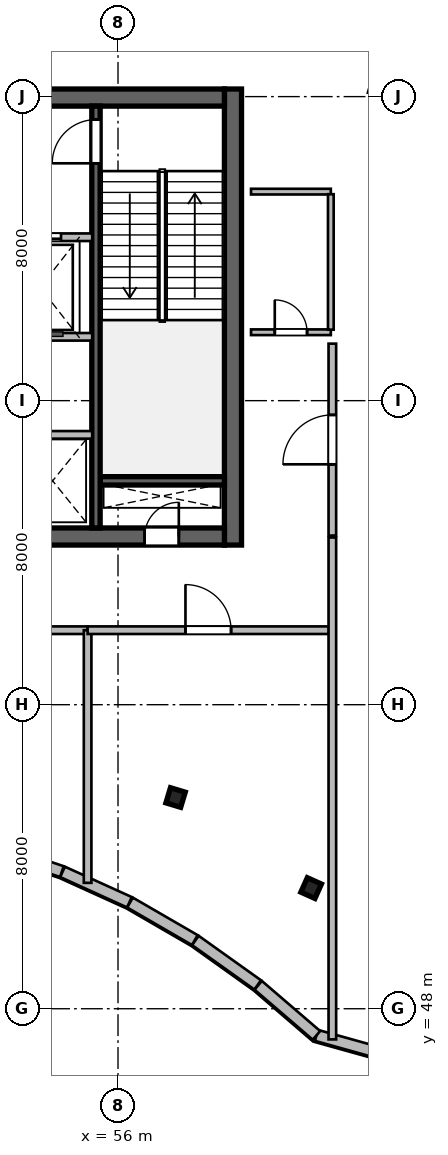
"""IFC4 building model, lengths in metres.
Left out: names, types, materials, properties, quantities, classifications, styles, units other than length and angle.
Written with IfcOpenShell. Run it as: python <this file> out.ifc"""

import sys

from ifc_helpers import new_model, si_unit, direction, frame, frame_2d, origin, origin_2d, place, context, subcontext, project, spatial, rectangle, i_section, extrude, source, transform, mapped, element, fill, save


model = new_model("IFC4")
c1 = context("Model", 3, precision=1e-05, world=origin(), true_north=direction((0.0, 1.0)))
c2 = subcontext(c1, "Body", "Model", "MODEL_VIEW")
j1 = project(units=[si_unit("LENGTHUNIT", "METRE"), si_unit("PLANEANGLEUNIT", "RADIAN")], contexts=[c1])
p1 = place(None, origin())
s1 = spatial("IfcSite", under=j1, at=p1, CompositionType="ELEMENT")
p2 = place(p1, origin())
s2 = spatial("IfcBuilding", under=s1, at=p2, CompositionType="ELEMENT")
p3 = place(p2, frame((0.0, 0.0, 254.7)))
s3 = spatial("IfcBuildingStorey", under=s2, at=p3, CompositionType="ELEMENT", Elevation=254.7)
m1 = source(origin(), c2, "Body", "SweptSolid", [
    extrude(rectangle(XDim=12.0, YDim=0.45, at=frame_2d((6.0, 0.0))), origin(), (0.0, 0.0, 1.0), 5.4),
])
p4 = place(p3, frame((59.025, 60.2, 0.0), z_axis=(0.0, 0.0, 1.0), x_axis=(0.0, 1.0, 0.0)))
e1 = element("IfcWall", 1, at=p4, inside=s3, PredefinedType="SHEAR", context=c2, shape_type="MappedRepresentation", body=[
    mapped(m1, transform((0.0, 0.0, 0.0), scale=1.0)),
])
m2 = source(origin(), c2, "Body", "SweptSolid", [
    extrude(rectangle(XDim=21.6, YDim=0.45, at=frame_2d((10.8, 0.0))), origin(), (0.0, 0.0, 1.0), 5.4),
])
p5 = place(p3, frame((37.2, 60.425, 0.0), z_axis=(0.0, 0.0, 1.0), x_axis=(1.0, 0.0, 0.0)))
e2 = element("IfcWall", 2, at=p5, inside=s3, PredefinedType="SHEAR", context=c2, shape_type="MappedRepresentation", body=[
    mapped(m2, transform((0.0, 0.0, 0.0), scale=1.0)),
])
p6 = place(p5, frame((1.1, 0.0, 0.0)))
e3 = element("IfcOpeningElement", 3, at=p6, cuts=e2, PredefinedType="OPENING", context=c2, shape_type="SweptSolid", body=[
    extrude(rectangle(XDim=1.15, YDim=2.15, at=frame_2d((0.575, 1.075))), frame((0.0, 0.235, 0.0), z_axis=(0.0, -1.0, 0.0), x_axis=(1.0, 0.0, 0.0)), (0.0, 0.0, 1.0), 0.47),
])
p7 = place(p5, frame((19.5, 0.0, 0.0)))
e4 = element("IfcOpeningElement", 4, at=p7, cuts=e2, PredefinedType="OPENING", context=c2, shape_type="SweptSolid", body=[
    extrude(rectangle(XDim=0.9, YDim=2.1, at=frame_2d((0.45, 1.05))), frame((0.0, 0.235, 0.0), z_axis=(0.0, -1.0, 0.0), x_axis=(1.0, 0.0, 0.0)), (0.0, 0.0, 1.0), 0.47),
])
p8 = place(p5, frame((12.02, 0.0, 0.0)))
e5 = element("IfcOpeningElement", 5, at=p8, cuts=e2, PredefinedType="OPENING", context=c2, shape_type="SweptSolid", body=[
    extrude(rectangle(XDim=1.6, YDim=2.15, at=frame_2d((0.8, 1.075))), frame((0.0, 0.235, 0.0), z_axis=(0.0, -1.0, 0.0), x_axis=(1.0, 0.0, 0.0)), (0.0, 0.0, 1.0), 0.47),
])
p9 = place(p3, frame((37.2, 71.975, 0.0), z_axis=(0.0, 0.0, 1.0), x_axis=(1.0, 0.0, 0.0)))
e6 = element("IfcWall", 6, at=p9, inside=s3, PredefinedType="SHEAR", context=c2, shape_type="MappedRepresentation", body=[
    mapped(m2, transform((0.0, 0.0, 0.0), scale=1.0)),
])
p10 = place(p9, frame((1.2, 0.0, 0.0)))
e7 = element("IfcOpeningElement", 7, at=p10, cuts=e6, PredefinedType="OPENING", context=c2, shape_type="SweptSolid", body=[
    extrude(rectangle(XDim=0.9, YDim=2.1, at=frame_2d((0.45, 1.05))), frame((0.0, 0.235, 0.0), z_axis=(0.0, -1.0, 0.0), x_axis=(1.0, 0.0, 0.0)), (0.0, 0.0, 1.0), 0.47),
])
p11 = place(p9, frame((14.7, 0.0, 0.0)))
e8 = element("IfcOpeningElement", 8, at=p11, cuts=e6, PredefinedType="OPENING", context=c2, shape_type="SweptSolid", body=[
    extrude(rectangle(XDim=1.2, YDim=2.15, at=frame_2d((0.6, 1.075))), frame((0.0, 0.235, 0.0), z_axis=(0.0, -1.0, 0.0), x_axis=(1.0, 0.0, 0.0)), (0.0, 0.0, 1.0), 0.47),
])
p12 = place(p9, frame((4.15, 0.0, 0.0)))
e9 = element("IfcOpeningElement", 9, at=p12, cuts=e6, PredefinedType="OPENING", context=c2, shape_type="SweptSolid", body=[
    extrude(rectangle(XDim=1.3, YDim=2.15, at=frame_2d((0.65, 1.075))), frame((0.0, 0.235, 0.0), z_axis=(0.0, -1.0, 0.0), x_axis=(1.0, 0.0, 0.0)), (0.0, 0.0, 1.0), 0.47),
])
p13 = place(p9, frame((7.1, 0.0, 0.0)))
e10 = element("IfcOpeningElement", 10, at=p13, cuts=e6, PredefinedType="OPENING", context=c2, shape_type="SweptSolid", body=[
    extrude(rectangle(XDim=0.9, YDim=2.1, at=frame_2d((0.45, 1.05))), frame((0.0, 0.235, 0.0), z_axis=(0.0, -1.0, 0.0), x_axis=(1.0, 0.0, 0.0)), (0.0, 0.0, 1.0), 0.47),
])
m3 = source(origin(), c2, "Body", "SweptSolid", [
    extrude(rectangle(XDim=3.27, YDim=0.22, at=frame_2d((1.635, 0.0))), origin(), (0.0, 0.0, 1.0), 5.4),
])
p14 = place(p3, frame((55.53, 61.89, 0.0), z_axis=(0.0, 0.0, 1.0), x_axis=(1.0, 0.0, 0.0)))
e11 = element("IfcWall", 11, at=p14, inside=s3, PredefinedType="SHEAR", context=c2, shape_type="MappedRepresentation", body=[
    mapped(m3, transform((0.0, 0.0, 0.0), scale=1.0)),
])
m4 = source(origin(), c2, "Body", "SweptSolid", [
    extrude(rectangle(XDim=11.1, YDim=0.22, at=frame_2d((5.55, 0.0))), origin(), (0.0, 0.0, 1.0), 5.4),
])
p15 = place(p3, frame((55.42, 60.65, 0.0), z_axis=(0.0, 0.0, 1.0), x_axis=(0.0, 1.0, 0.0)))
e12 = element("IfcWall", 12, at=p15, inside=s3, PredefinedType="SHEAR", context=c2, shape_type="MappedRepresentation", body=[
    mapped(m4, transform((0.0, 0.0, 0.0), scale=1.0)),
])
p16 = place(p15, frame((9.595, 0.0, 0.0)))
e13 = element("IfcOpeningElement", 13, at=p16, cuts=e12, PredefinedType="OPENING", context=c2, shape_type="SweptSolid", body=[
    extrude(rectangle(XDim=1.15, YDim=2.15, at=frame_2d((0.575, 1.075))), frame((0.0, 0.12, 0.0), z_axis=(0.0, -1.0, 0.0), x_axis=(1.0, 0.0, 0.0)), (0.0, 0.0, 1.0), 0.24),
])
m5 = source(origin(), c2, "Body", "SweptSolid", [
    extrude(i_section(OverallWidth=0.406, OverallDepth=0.416, WebThickness=0.03, FlangeThickness=0.048, at=origin_2d()), origin(), (0.0, 0.0, 1.0), 5.4),
])
for number, where, z_axis, x_axis in (
    (14, (57.515, 53.558, 0.0), (0.0, 0.0, 1.0), (0.289, 0.957, 0.0)),
    (15, (61.082, 51.175, 0.0), (0.0, 0.0, 1.0), (0.409, 0.912, 0.0)),
):
    element("IfcColumn", number, at=place(p3, frame(where, z_axis=z_axis, x_axis=x_axis)), inside=s3, PredefinedType="COLUMN", context=c2, shape_type="MappedRepresentation", body=[
        mapped(m5, transform((0.0, 0.0, 0.0), scale=1.0)),
    ])
m6 = source(origin(), c2, "Body", "SweptSolid", [
    extrude(rectangle(XDim=4.847, YDim=0.3, at=frame_2d((2.424, 0.0))), origin(), (0.0, 0.0, 1.0), 5.15),
])
p17 = place(p3, frame((65.891, 45.996, 0.0), z_axis=(0.0, 0.0, 1.0), x_axis=(-0.963208430762, 0.268755500238, 0.0)))
e16 = element("IfcWall", 16, at=p17, inside=s3, PredefinedType="SOLIDWALL", context=c2, shape_type="MappedRepresentation", body=[
    mapped(m6, transform((0.0, 0.0, 0.0), scale=1.0)),
])
m7 = source(origin(), c2, "Body", "SweptSolid", [
    extrude(rectangle(XDim=2.022, YDim=0.3, at=frame_2d((1.011, 0.0))), origin(), (0.0, 0.0, 1.0), 5.15),
])
p18 = place(p3, frame((61.222, 47.299, 0.0), z_axis=(0.0, 0.0, 1.0), x_axis=(-0.758343943716, 0.651854633358, 0.0)))
e17 = element("IfcWall", 17, at=p18, inside=s3, PredefinedType="SOLIDWALL", context=c2, shape_type="MappedRepresentation", body=[
    mapped(m7, transform((0.0, 0.0, 0.0), scale=1.0)),
])
m8 = source(origin(), c2, "Body", "SweptSolid", [
    extrude(rectangle(XDim=2.014, YDim=0.3, at=frame_2d((1.007, 0.0))), origin(), (0.0, 0.0, 1.0), 5.15),
])
p19 = place(p3, frame((59.675, 48.627, 0.0), z_axis=(0.0, 0.0, 1.0), x_axis=(-0.814126378736, 0.580687729719, 0.0)))
e18 = element("IfcWall", 18, at=p19, inside=s3, PredefinedType="SOLIDWALL", context=c2, shape_type="MappedRepresentation", body=[
    mapped(m8, transform((0.0, 0.0, 0.0), scale=1.0)),
])
m9 = source(origin(), c2, "Body", "SweptSolid", [
    extrude(rectangle(XDim=1.971, YDim=0.3, at=frame_2d((0.985, 0.0))), origin(), (0.0, 0.0, 1.0), 5.15),
])
p20 = place(p3, frame((58.021, 49.806, 0.0), z_axis=(0.0, 0.0, 1.0), x_axis=(-0.865347122034, 0.5011729825, 0.0)))
e19 = element("IfcWall", 19, at=p20, inside=s3, PredefinedType="SOLIDWALL", context=c2, shape_type="MappedRepresentation", body=[
    mapped(m9, transform((0.0, 0.0, 0.0), scale=1.0)),
])
m10 = source(origin(), c2, "Body", "SweptSolid", [
    extrude(rectangle(XDim=1.933, YDim=0.3, at=frame_2d((0.966, 0.0))), origin(), (0.0, 0.0, 1.0), 5.15),
])
p21 = place(p3, frame((56.3, 50.802, 0.0), z_axis=(0.0, 0.0, 1.0), x_axis=(-0.910478916145, 0.413555489936, 0.0)))
e20 = element("IfcWall", 20, at=p21, inside=s3, PredefinedType="SOLIDWALL", context=c2, shape_type="MappedRepresentation", body=[
    mapped(m10, transform((0.0, 0.0, 0.0), scale=1.0)),
])
m11 = source(origin(), c2, "Body", "SweptSolid", [
    extrude(rectangle(XDim=1.901, YDim=0.3, at=frame_2d((0.951, 0.0))), origin(), (0.0, 0.0, 1.0), 5.15),
])
p22 = place(p3, frame((54.523, 51.608, 0.0), z_axis=(0.0, 0.0, 1.0), x_axis=(-0.94793587841, 0.318461254194, 0.0)))
e21 = element("IfcWall", 21, at=p22, inside=s3, PredefinedType="SOLIDWALL", context=c2, shape_type="MappedRepresentation", body=[
    mapped(m11, transform((0.0, 0.0, 0.0), scale=1.0)),
])
m12 = source(origin(), c2, "Body", "SweptSolid", [
    extrude(rectangle(XDim=5.62, YDim=0.2, at=frame_2d((2.81, 0.0))), origin(), (0.0, 0.0, 1.0), 5.15),
])
p23 = place(p3, frame((49.7, 68.3, 0.0), z_axis=(0.0, 0.0, 1.0), x_axis=(1.0, 0.0, 0.0)))
e22 = element("IfcWall", 22, at=p23, inside=s3, PredefinedType="SOLIDWALL", context=c2, shape_type="MappedRepresentation", body=[
    mapped(m12, transform((0.0, 0.0, 0.0), scale=1.0)),
])
p24 = place(p23, frame((1.6, 0.0, 0.0)))
e23 = element("IfcOpeningElement", 23, at=p24, cuts=e22, PredefinedType="OPENING", context=c2, shape_type="SweptSolid", body=[
    extrude(rectangle(XDim=1.1, YDim=2.15, at=frame_2d((0.55, 1.075))), frame((0.0, 0.11, 0.0), z_axis=(0.0, -1.0, 0.0), x_axis=(1.0, 0.0, 0.0)), (0.0, 0.0, 1.0), 0.22),
])
p25 = place(p23, frame((3.7, 0.0, 0.0)))
e24 = element("IfcOpeningElement", 24, at=p25, cuts=e22, PredefinedType="OPENING", context=c2, shape_type="SweptSolid", body=[
    extrude(rectangle(XDim=1.1, YDim=2.15, at=frame_2d((0.55, 1.075))), frame((0.0, 0.11, 0.0), z_axis=(0.0, -1.0, 0.0), x_axis=(1.0, 0.0, 0.0)), (0.0, 0.0, 1.0), 0.22),
])
p26 = place(p3, frame((49.7, 65.68, 0.0), z_axis=(0.0, 0.0, 1.0), x_axis=(1.0, 0.0, 0.0)))
e25 = element("IfcWall", 25, at=p26, inside=s3, PredefinedType="SOLIDWALL", context=c2, shape_type="MappedRepresentation", body=[
    mapped(m12, transform((0.0, 0.0, 0.0), scale=1.0)),
])
m13 = source(origin(), c2, "Body", "SweptSolid", [
    extrude(rectangle(XDim=4.1, YDim=0.2, at=frame_2d((2.05, 0.0))), origin(), (0.0, 0.0, 1.0), 5.15),
])
p27 = place(p3, frame((51.22, 63.1, 0.0), z_axis=(0.0, 0.0, 1.0), x_axis=(1.0, 0.0, 0.0)))
e26 = element("IfcWall", 26, at=p27, inside=s3, PredefinedType="SOLIDWALL", context=c2, shape_type="MappedRepresentation", body=[
    mapped(m13, transform((0.0, 0.0, 0.0), scale=1.0)),
])
m14 = source(origin(), c2, "Body", "SweptSolid", [
    extrude(rectangle(XDim=2.1, YDim=0.15, at=frame_2d((1.05, 0.0))), origin(), (0.0, 0.0, 1.0), 5.15),
])
p28 = place(p3, frame((59.5, 65.8, 0.0), z_axis=(0.0, 0.0, 1.0), x_axis=(1.0, 0.0, 0.0)))
e27 = element("IfcWall", 27, at=p28, inside=s3, PredefinedType="PARTITIONING", context=c2, shape_type="MappedRepresentation", body=[
    mapped(m14, transform((0.0, 0.0, 0.0), scale=1.0)),
])
p29 = place(p28, frame((0.625, 0.0, 0.0)))
e28 = element("IfcOpeningElement", 28, at=p29, cuts=e27, PredefinedType="OPENING", context=c2, shape_type="SweptSolid", body=[
    extrude(rectangle(XDim=0.85, YDim=2.1, at=frame_2d((0.425, 1.05))), frame((0.0, 0.085, 0.0), z_axis=(0.0, -1.0, 0.0), x_axis=(1.0, 0.0, 0.0)), (0.0, 0.0, 1.0), 0.17),
])
p30 = place(p3, frame((59.5, 69.5, 0.0), z_axis=(0.0, 0.0, 1.0), x_axis=(1.0, 0.0, 0.0)))
e29 = element("IfcWall", 29, at=p30, inside=s3, PredefinedType="PARTITIONING", context=c2, shape_type="MappedRepresentation", body=[
    mapped(m14, transform((0.0, 0.0, 0.0), scale=1.0)),
])
m15 = source(origin(), c2, "Body", "SweptSolid", [
    extrude(rectangle(XDim=3.565, YDim=0.15, at=frame_2d((1.783, 0.0))), origin(), (0.0, 0.0, 1.0), 5.15),
])
p31 = place(p3, frame((61.6, 65.867, 0.0), z_axis=(0.0, 0.0, 1.0), x_axis=(0.0, 1.0, 0.0)))
e30 = element("IfcWall", 30, at=p31, inside=s3, PredefinedType="PARTITIONING", context=c2, shape_type="MappedRepresentation", body=[
    mapped(m15, transform((0.0, 0.0, 0.0), scale=1.0)),
])
m16 = source(origin(), c2, "Body", "SweptSolid", [
    extrude(rectangle(XDim=6.4, YDim=0.2, at=frame_2d((3.2, 0.0))), origin(), (0.0, 0.0, 1.0), 5.15),
])
p32 = place(p3, frame((48.8, 57.96, 0.0), z_axis=(0.0, 0.0, 1.0), x_axis=(1.0, 0.0, 0.0)))
e31 = element("IfcWall", 31, at=p32, inside=s3, PredefinedType="SOLIDWALL", context=c2, shape_type="MappedRepresentation", body=[
    mapped(m16, transform((0.0, 0.0, 0.0), scale=1.0)),
])
p33 = place(p32, frame((2.6, 0.0, 0.0)))
e32 = element("IfcOpeningElement", 32, at=p33, cuts=e31, PredefinedType="OPENING", context=c2, shape_type="SweptSolid", body=[
    extrude(rectangle(XDim=1.2, YDim=2.15, at=frame_2d((0.6, 1.075))), frame((0.0, 0.11, 0.0), z_axis=(0.0, -1.0, 0.0), x_axis=(1.0, 0.0, 0.0)), (0.0, 0.0, 1.0), 0.22),
])
m17 = source(origin(), c2, "Body", "SweptSolid", [
    extrude(rectangle(XDim=6.647, YDim=0.2, at=frame_2d((3.324, 0.0))), origin(), (0.0, 0.0, 1.0), 5.15),
])
p34 = place(p3, frame((55.2, 51.312, 0.0), z_axis=(0.0, 0.0, 1.0), x_axis=(0.0, 1.0, 0.0)))
e33 = element("IfcWall", 33, at=p34, inside=s3, PredefinedType="SOLIDWALL", context=c2, shape_type="MappedRepresentation", body=[
    mapped(m17, transform((0.0, 0.0, 0.0), scale=1.0)),
])
m18 = source(origin(), c2, "Body", "SweptSolid", [
    extrude(rectangle(XDim=6.35, YDim=0.2, at=frame_2d((3.175, 0.0))), origin(), (0.0, 0.0, 1.0), 4.824),
])
p35 = place(p3, frame((55.2, 57.96, 0.0), z_axis=(0.0, 0.0, 1.0), x_axis=(1.0, 0.0, 0.0)))
e34 = element("IfcWall", 34, at=p35, inside=s3, PredefinedType="SOLIDWALL", context=c2, shape_type="MappedRepresentation", body=[
    mapped(m18, transform((0.0, 0.0, 0.0), scale=1.0)),
])
p36 = place(p35, frame((2.575, 0.0, 0.0)))
e35 = element("IfcOpeningElement", 35, at=p36, cuts=e34, PredefinedType="OPENING", context=c2, shape_type="SweptSolid", body=[
    extrude(rectangle(XDim=1.2, YDim=2.15, at=frame_2d((0.6, 1.075))), frame((0.0, 0.11, 0.0), z_axis=(0.0, -1.0, 0.0), x_axis=(1.0, 0.0, 0.0)), (0.0, 0.0, 1.0), 0.22),
])
m19 = source(origin(), c2, "Body", "SweptSolid", [
    extrude(rectangle(XDim=13.207, YDim=0.2, at=frame_2d((6.604, 0.0))), origin(), (0.0, 0.0, 1.0), 4.508),
])
p37 = place(p3, frame((61.64, 47.193, 0.0), z_axis=(0.0, 0.0, 1.0), x_axis=(0.0, 1.0, 0.0)))
e36 = element("IfcWall", 36, at=p37, inside=s3, PredefinedType="SOLIDWALL", context=c2, shape_type="MappedRepresentation", body=[
    mapped(m19, transform((0.0, 0.0, 0.0), scale=1.0)),
])
m20 = source(origin(), c2, "Body", "SweptSolid", [
    extrude(rectangle(XDim=5.05, YDim=0.2, at=frame_2d((2.525, 0.0))), origin(), (0.0, 0.0, 1.0), 5.15),
])
p38 = place(p3, frame((61.64, 60.45, 0.0), z_axis=(0.0, 0.0, 1.0), x_axis=(0.0, 1.0, 0.0)))
e37 = element("IfcWall", 37, at=p38, inside=s3, PredefinedType="SOLIDWALL", context=c2, shape_type="MappedRepresentation", body=[
    mapped(m20, transform((0.0, 0.0, 0.0), scale=1.0)),
])
p39 = place(p38, frame((1.875, 0.0, 0.0)))
e38 = element("IfcOpeningElement", 38, at=p39, cuts=e37, PredefinedType="OPENING", context=c2, shape_type="SweptSolid", body=[
    extrude(rectangle(XDim=1.3, YDim=2.15, at=frame_2d((0.65, 1.075))), frame((0.0, 0.11, 0.0), z_axis=(0.0, -1.0, 0.0), x_axis=(1.0, 0.0, 0.0)), (0.0, 0.0, 1.0), 0.22),
])
m21 = source(origin(), c2, "Body", "SweptSolid", [
    extrude(rectangle(XDim=0.9, YDim=2.1, at=frame_2d((0.45, 1.05))), frame((0.0, 0.025, 0.0), z_axis=(0.0, -1.0, 0.0), x_axis=(1.0, 0.0, 0.0)), (0.0, 0.0, 1.0), 0.05),
])
p40 = place(p7, origin())
e39 = element("IfcDoor", 39, at=p40, inside=s3, OperationType="SINGLE_SWING_RIGHT", PredefinedType="DOOR", context=c2, shape_type="MappedRepresentation", body=[
    mapped(m21, transform((0.0, 0.0, 0.0), scale=1.0)),
])
fill(e4, e39)
m22 = source(origin(), c2, "Body", "SweptSolid", [
    extrude(rectangle(XDim=1.15, YDim=2.15, at=frame_2d((0.575, 1.075))), frame((0.0, 0.025, 0.0), z_axis=(0.0, -1.0, 0.0), x_axis=(1.0, 0.0, 0.0)), (0.0, 0.0, 1.0), 0.05),
])
p41 = place(p16, origin())
e40 = element("IfcDoor", 40, at=p41, inside=s3, OperationType="SINGLE_SWING_LEFT", PredefinedType="DOOR", context=c2, shape_type="MappedRepresentation", body=[
    mapped(m22, transform((0.0, 0.0, 0.0), scale=1.0)),
])
fill(e13, e40)
m23 = source(origin(), c2, "Body", "SweptSolid", [
    extrude(rectangle(XDim=1.1, YDim=2.15, at=frame_2d((0.55, 1.075))), frame((0.0, 0.025, 0.0), z_axis=(0.0, -1.0, 0.0), x_axis=(1.0, 0.0, 0.0)), (0.0, 0.0, 1.0), 0.05),
])
p42 = place(p25, origin())
e41 = element("IfcDoor", 41, at=p42, inside=s3, OperationType="DOUBLE_DOOR_SLIDING", PredefinedType="DOOR", context=c2, shape_type="MappedRepresentation", body=[
    mapped(m23, transform((0.0, 0.0, 0.0), scale=1.0)),
])
fill(e24, e41)
m24 = source(origin(), c2, "Body", "SweptSolid", [
    extrude(rectangle(XDim=0.85, YDim=2.1, at=frame_2d((0.425, 1.05))), frame((0.0, 0.025, 0.0), z_axis=(0.0, -1.0, 0.0), x_axis=(1.0, 0.0, 0.0)), (0.0, 0.0, 1.0), 0.05),
])
p43 = place(p29, origin())
e42 = element("IfcDoor", 42, at=p43, inside=s3, OperationType="SINGLE_SWING_LEFT", PredefinedType="DOOR", context=c2, shape_type="MappedRepresentation", body=[
    mapped(m24, transform((0.0, 0.0, 0.0), scale=1.0)),
])
fill(e28, e42)
m25 = source(origin(), c2, "Body", "SweptSolid", [
    extrude(rectangle(XDim=1.2, YDim=2.15, at=frame_2d((0.6, 1.075))), frame((0.0, 0.025, 0.0), z_axis=(0.0, -1.0, 0.0), x_axis=(1.0, 0.0, 0.0)), (0.0, 0.0, 1.0), 0.05),
])
p44 = place(p36, origin())
e43 = element("IfcDoor", 43, at=p44, inside=s3, OperationType="SINGLE_SWING_LEFT", PredefinedType="DOOR", context=c2, shape_type="MappedRepresentation", body=[
    mapped(m25, transform((0.0, 0.0, 0.0), scale=1.0)),
])
fill(e35, e43)
m26 = source(origin(), c2, "Body", "SweptSolid", [
    extrude(rectangle(XDim=1.3, YDim=2.15, at=frame_2d((0.65, 1.075))), frame((0.0, 0.025, 0.0), z_axis=(0.0, -1.0, 0.0), x_axis=(1.0, 0.0, 0.0)), (0.0, 0.0, 1.0), 0.05),
])
p45 = place(p39, origin())
e44 = element("IfcDoor", 44, at=p45, inside=s3, OperationType="SINGLE_SWING_LEFT", PredefinedType="DOOR", context=c2, shape_type="MappedRepresentation", body=[
    mapped(m26, transform((0.0, 0.0, 0.0), scale=1.0)),
])
fill(e38, e44)
save(model, sys.argv[1])
